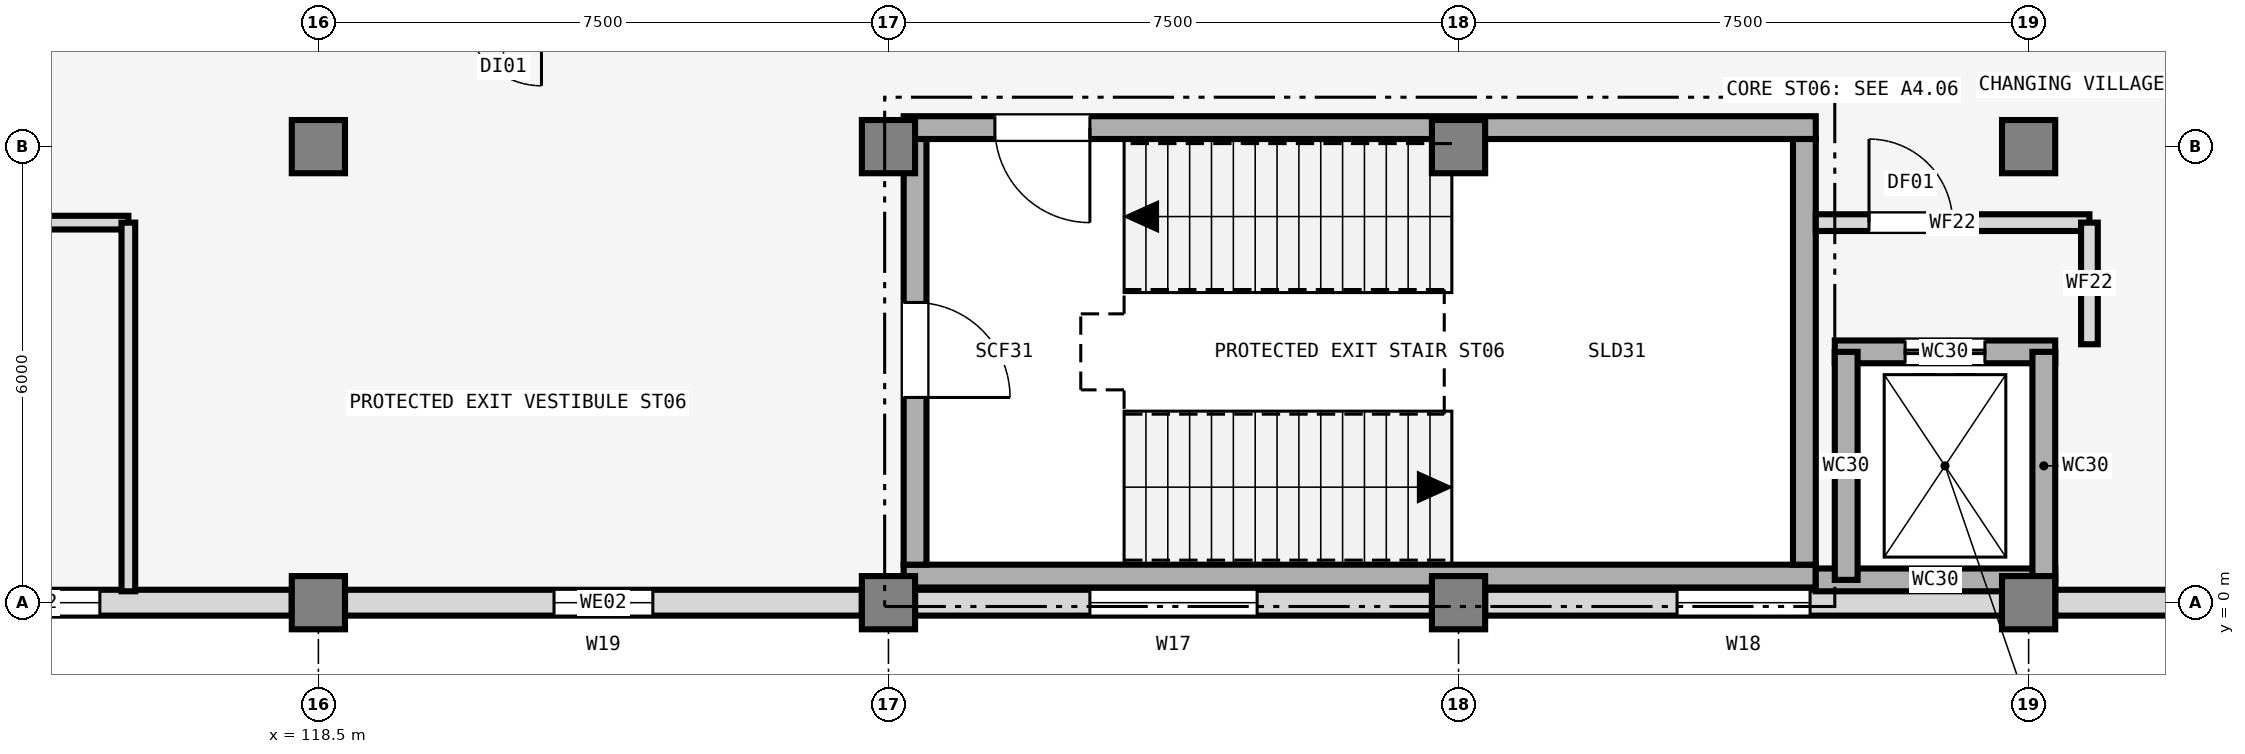
"""IFC4 building model, lengths in metres.
Left out: names, types, materials, properties, quantities, classifications, styles, units other than length and angle.
Written with IfcOpenShell. Run it as: python <this file> out.ifc"""

import sys

from ifc_helpers import new_model, si_unit, direction, frame, frame_2d, origin, origin_2d, place, context, subcontext, project, spatial, rectangle, extrude, element, fill, save


model = new_model("IFC4")
c1 = context("Model", 3, precision=1e-05, world=origin(), true_north=direction((0.0, 1.0)))
c2 = subcontext(c1, "Body", "Model", "MODEL_VIEW")
j1 = project(units=[si_unit("LENGTHUNIT", "METRE"), si_unit("PLANEANGLEUNIT", "RADIAN")], contexts=[c1])
p1 = place(None, origin())
s1 = spatial("IfcSite", under=j1, at=p1, CompositionType="ELEMENT")
p2 = place(p1, origin())
s2 = spatial("IfcBuilding", under=s1, at=p2, CompositionType="ELEMENT")
p3 = place(p2, origin())
s3 = spatial("IfcBuildingStorey", under=s2, at=p3, CompositionType="ELEMENT", Elevation=0.0)
for number, where, z_axis, x_axis in (
    (1, (118.5, 0.0, 0.0), (0.0, 0.0, 1.0), (1.0, 0.0, 0.0)),
    (2, (118.5, 6.0, 0.0), (0.0, 0.0, 1.0), (1.0, 0.0, 0.0)),
    (3, (126.0, 0.0, 0.0), (0.0, 0.0, 1.0), (1.0, 0.0, 0.0)),
    (4, (126.0, 6.0, 0.0), (0.0, 0.0, 1.0), (1.0, 0.0, 0.0)),
    (5, (133.5, 0.0, 0.0), (0.0, 0.0, 1.0), (1.0, 0.0, 0.0)),
    (6, (133.5, 6.0, 0.0), (0.0, 0.0, 1.0), (1.0, 0.0, 0.0)),
    (7, (141.0, 0.0, 0.0), (0.0, 0.0, 1.0), (1.0, 0.0, 0.0)),
    (8, (141.0, 6.0, 0.0), (0.0, 0.0, 1.0), (1.0, 0.0, 0.0)),
):
    element("IfcColumn", number, at=place(p3, frame(where, z_axis=z_axis, x_axis=x_axis)), inside=s3, PredefinedType="COLUMN", context=c2, shape_type="SweptSolid", body=[
        extrude(rectangle(XDim=0.7, YDim=0.7, at=origin_2d()), origin(), (0.0, 0.0, 1.0), 4.8),
    ])
p4 = place(p3, frame((111.35, 0.0, 0.0), z_axis=(0.0, 0.0, 1.0), x_axis=(1.0, 0.0, 0.0)))
e9 = element("IfcWall", 9, at=p4, inside=s3, PredefinedType="SOLIDWALL", context=c2, shape_type="SweptSolid", body=[
    extrude(rectangle(XDim=6.8, YDim=0.34, at=frame_2d((3.4, 0.0))), origin(), (0.0, 0.0, 1.0), 3.93),
])
p5 = place(p4, frame((2.525, 0.0, 2.05)))
e10 = element("IfcOpeningElement", 10, at=p5, cuts=e9, PredefinedType="OPENING", context=c2, shape_type="SweptSolid", body=[
    extrude(rectangle(XDim=1.75, YDim=0.9, at=frame_2d((0.875, 0.45))), frame((0.0, 0.18, 0.0), z_axis=(0.0, -1.0, 0.0), x_axis=(1.0, 0.0, 0.0)), (0.0, 0.0, 1.0), 0.36),
])
p6 = place(p3, frame((118.85, 0.0, 0.0), z_axis=(0.0, 0.0, 1.0), x_axis=(1.0, 0.0, 0.0)))
e11 = element("IfcWall", 11, at=p6, inside=s3, PredefinedType="SOLIDWALL", context=c2, shape_type="SweptSolid", body=[
    extrude(rectangle(XDim=6.8, YDim=0.34, at=frame_2d((3.4, 0.0))), origin(), (0.0, 0.0, 1.0), 3.93),
])
p7 = place(p6, frame((2.75, 0.0, 2.05)))
e12 = element("IfcOpeningElement", 12, at=p7, cuts=e11, PredefinedType="OPENING", context=c2, shape_type="SweptSolid", body=[
    extrude(rectangle(XDim=1.3, YDim=0.85, at=frame_2d((0.65, 0.425))), frame((0.0, 0.18, 0.0), z_axis=(0.0, -1.0, 0.0), x_axis=(1.0, 0.0, 0.0)), (0.0, 0.0, 1.0), 0.36),
])
p8 = place(p3, frame((126.35, 0.0, 0.0), z_axis=(0.0, 0.0, 1.0), x_axis=(1.0, 0.0, 0.0)))
e13 = element("IfcWall", 13, at=p8, inside=s3, PredefinedType="SOLIDWALL", context=c2, shape_type="SweptSolid", body=[
    extrude(rectangle(XDim=6.8, YDim=0.34, at=frame_2d((3.4, 0.0))), origin(), (0.0, 0.0, 1.0), 3.93),
])
p9 = place(p8, frame((2.3, 0.0, 2.05)))
e14 = element("IfcOpeningElement", 14, at=p9, cuts=e13, PredefinedType="OPENING", context=c2, shape_type="SweptSolid", body=[
    extrude(rectangle(XDim=2.2, YDim=0.95, at=frame_2d((1.1, 0.475))), frame((0.0, 0.18, 0.0), z_axis=(0.0, -1.0, 0.0), x_axis=(1.0, 0.0, 0.0)), (0.0, 0.0, 1.0), 0.36),
])
p10 = place(p3, frame((133.85, 0.0, 0.0), z_axis=(0.0, 0.0, 1.0), x_axis=(1.0, 0.0, 0.0)))
e15 = element("IfcWall", 15, at=p10, inside=s3, PredefinedType="SOLIDWALL", context=c2, shape_type="SweptSolid", body=[
    extrude(rectangle(XDim=6.8, YDim=0.34, at=frame_2d((3.4, 0.0))), origin(), (0.0, 0.0, 1.0), 3.93),
])
p11 = place(p10, frame((2.525, 0.0, 2.05)))
e16 = element("IfcOpeningElement", 16, at=p11, cuts=e15, PredefinedType="OPENING", context=c2, shape_type="SweptSolid", body=[
    extrude(rectangle(XDim=1.75, YDim=0.9, at=frame_2d((0.875, 0.45))), frame((0.0, 0.18, 0.0), z_axis=(0.0, -1.0, 0.0), x_axis=(1.0, 0.0, 0.0)), (0.0, 0.0, 1.0), 0.36),
])
p12 = place(p3, frame((141.35, 0.0, 0.0), z_axis=(0.0, 0.0, 1.0), x_axis=(1.0, 0.0, 0.0)))
e17 = element("IfcWall", 17, at=p12, inside=s3, PredefinedType="SOLIDWALL", context=c2, shape_type="SweptSolid", body=[
    extrude(rectangle(XDim=8.3, YDim=0.34, at=frame_2d((4.15, 0.0))), origin(), (0.0, 0.0, 1.0), 3.93),
])
p13 = place(p12, frame((2.85, 0.0, 0.0)))
e18 = element("IfcOpeningElement", 18, at=p13, cuts=e17, PredefinedType="OPENING", context=c2, shape_type="SweptSolid", body=[
    extrude(rectangle(XDim=2.6, YDim=2.5, at=frame_2d((1.3, 1.25))), frame((0.0, 0.18, 0.0), z_axis=(0.0, -1.0, 0.0), x_axis=(1.0, 0.0, 0.0)), (0.0, 0.0, 1.0), 0.36),
])
p14 = place(p3, frame((138.2, 0.35, 0.0), z_axis=(0.0, 0.0, 1.0), x_axis=(-1.0, 0.0, 0.0)))
e19 = element("IfcWall", 19, at=p14, inside=s3, PredefinedType="SHEAR", context=c2, shape_type="SweptSolid", body=[
    extrude(rectangle(XDim=12.0, YDim=0.3, at=frame_2d((6.0, 0.0))), origin(), (0.0, 0.0, 1.0), 4.8),
])
p15 = place(p3, frame((138.2, 6.25, 0.0), z_axis=(0.0, 0.0, 1.0), x_axis=(-1.0, 0.0, 0.0)))
e20 = element("IfcWall", 20, at=p15, inside=s3, PredefinedType="SHEAR", context=c2, shape_type="SweptSolid", body=[
    extrude(rectangle(XDim=12.0, YDim=0.3, at=frame_2d((6.0, 0.0))), origin(), (0.0, 0.0, 1.0), 4.8),
])
p16 = place(p15, frame((9.55, 0.0, 0.0)))
e21 = element("IfcOpeningElement", 21, at=p16, cuts=e20, PredefinedType="OPENING", context=c2, shape_type="SweptSolid", body=[
    extrude(rectangle(XDim=1.25, YDim=2.15, at=frame_2d((0.625, 1.075))), frame((0.0, 0.16, 0.0), z_axis=(0.0, -1.0, 0.0), x_axis=(1.0, 0.0, 0.0)), (0.0, 0.0, 1.0), 0.32),
])
p17 = place(p3, frame((126.35, 6.1, 0.0), z_axis=(0.0, 0.0, 1.0), x_axis=(0.0, -1.0, 0.0)))
e22 = element("IfcWall", 22, at=p17, inside=s3, PredefinedType="SHEAR", context=c2, shape_type="SweptSolid", body=[
    extrude(rectangle(XDim=5.6, YDim=0.3, at=frame_2d((2.8, 0.0))), origin(), (0.0, 0.0, 1.0), 4.8),
])
p18 = place(p17, frame((2.15, 0.0, 0.0)))
e23 = element("IfcOpeningElement", 23, at=p18, cuts=e22, PredefinedType="OPENING", context=c2, shape_type="SweptSolid", body=[
    extrude(rectangle(XDim=1.25, YDim=2.15, at=frame_2d((0.625, 1.075))), frame((0.0, 0.16, 0.0), z_axis=(0.0, -1.0, 0.0), x_axis=(1.0, 0.0, 0.0)), (0.0, 0.0, 1.0), 0.32),
])
p19 = place(p3, frame((138.05, 0.5, 0.0), z_axis=(0.0, 0.0, 1.0), x_axis=(0.0, 1.0, 0.0)))
e24 = element("IfcWall", 24, at=p19, inside=s3, PredefinedType="SHEAR", context=c2, shape_type="SweptSolid", body=[
    extrude(rectangle(XDim=5.6, YDim=0.3, at=frame_2d((2.8, 0.0))), origin(), (0.0, 0.0, 1.0), 4.8),
])
p20 = place(p3, frame((138.2, 0.3, 0.0), z_axis=(0.0, 0.0, 1.0), x_axis=(1.0, 0.0, 0.0)))
e25 = element("IfcWall", 25, at=p20, inside=s3, PredefinedType="SHEAR", context=c2, shape_type="SweptSolid", body=[
    extrude(rectangle(XDim=3.15, YDim=0.3, at=frame_2d((1.575, 0.0))), origin(), (0.0, 0.0, 1.0), 4.8),
])
p21 = place(p3, frame((141.35, 3.3, 0.0), z_axis=(0.0, 0.0, 1.0), x_axis=(-1.0, 0.0, 0.0)))
e26 = element("IfcWall", 26, at=p21, inside=s3, PredefinedType="SHEAR", context=c2, shape_type="SweptSolid", body=[
    extrude(rectangle(XDim=2.9, YDim=0.3, at=frame_2d((1.45, 0.0))), origin(), (0.0, 0.0, 1.0), 4.8),
])
p22 = place(p21, frame((0.925, 0.0, 0.0)))
e27 = element("IfcOpeningElement", 27, at=p22, cuts=e26, PredefinedType="OPENING", context=c2, shape_type="SweptSolid", body=[
    extrude(rectangle(XDim=1.05, YDim=2.15, at=frame_2d((0.525, 1.075))), frame((0.0, 0.16, 0.0), z_axis=(0.0, -1.0, 0.0), x_axis=(1.0, 0.0, 0.0)), (0.0, 0.0, 1.0), 0.32),
])
for number, where, z_axis, x_axis in (
    (28, (138.6, 3.3, 0.0), (0.0, 0.0, 1.0), (0.0, -1.0, 0.0)),
    (29, (141.2, 0.3, 0.0), (0.0, 0.0, 1.0), (0.0, 1.0, 0.0)),
):
    element("IfcWall", number, at=place(p3, frame(where, z_axis=z_axis, x_axis=x_axis)), inside=s3, PredefinedType="SHEAR", context=c2, shape_type="SweptSolid", body=[
        extrude(rectangle(XDim=3.0, YDim=0.3, at=frame_2d((1.5, 0.0))), origin(), (0.0, 0.0, 1.0), 4.8),
    ])
p23 = place(p3, frame((138.2, 5.0, 0.0), z_axis=(0.0, 0.0, 1.0), x_axis=(1.0, 0.0, 0.0)))
e30 = element("IfcWall", 30, at=p23, inside=s3, PredefinedType="SOLIDWALL", context=c2, shape_type="SweptSolid", body=[
    extrude(rectangle(XDim=3.6, YDim=0.22, at=frame_2d((1.8, 0.0))), origin(), (0.0, 0.0, 1.0), 3.68),
])
p24 = place(p23, frame((0.7, 0.0, 0.0)))
e31 = element("IfcOpeningElement", 31, at=p24, cuts=e30, PredefinedType="OPENING", context=c2, shape_type="SweptSolid", body=[
    extrude(rectangle(XDim=1.1, YDim=2.15, at=frame_2d((0.55, 1.075))), frame((0.0, 0.12, 0.0), z_axis=(0.0, -1.0, 0.0), x_axis=(1.0, 0.0, 0.0)), (0.0, 0.0, 1.0), 0.24),
])
p25 = place(p3, frame((141.8, 3.4, 0.0), z_axis=(0.0, 0.0, 1.0), x_axis=(0.0, 1.0, 0.0)))
e32 = element("IfcWall", 32, at=p25, inside=s3, PredefinedType="SOLIDWALL", context=c2, shape_type="SweptSolid", body=[
    extrude(rectangle(XDim=1.6, YDim=0.22, at=frame_2d((0.8, 0.0))), origin(), (0.0, 0.0, 1.0), 3.68),
])
p26 = place(p3, frame((82.07, 5.0, 0.0), z_axis=(0.0, 0.0, 1.0), x_axis=(1.0, 0.0, 0.0)))
e33 = element("IfcWall", 33, at=p26, inside=s3, PredefinedType="PARTITIONING", context=c2, shape_type="SweptSolid", body=[
    extrude(rectangle(XDim=33.93, YDim=0.18, at=frame_2d((16.965, 0.0))), origin(), (0.0, 0.0, 1.0), 3.68),
])
p27 = place(p26, frame((16.415, 0.0, 0.0)))
e34 = element("IfcOpeningElement", 34, at=p27, cuts=e33, PredefinedType="OPENING", context=c2, shape_type="SweptSolid", body=[
    extrude(rectangle(XDim=1.1, YDim=2.1, at=frame_2d((0.55, 1.05))), frame((0.0, 0.1, 0.0), z_axis=(0.0, -1.0, 0.0), x_axis=(1.0, 0.0, 0.0)), (0.0, 0.0, 1.0), 0.2),
])
p28 = place(p3, frame((116.0, 5.0, 0.0), z_axis=(0.0, 0.0, 1.0), x_axis=(0.0, -1.0, 0.0)))
e35 = element("IfcWall", 35, at=p28, inside=s3, PredefinedType="PARTITIONING", context=c2, shape_type="SweptSolid", body=[
    extrude(rectangle(XDim=4.85, YDim=0.18, at=frame_2d((2.425, 0.0))), origin(), (0.0, 0.0, 1.0), 3.68),
])
p29 = place(p5, origin())
e36 = element("IfcWindow", 36, at=p29, inside=s3, PartitioningType="SINGLE_PANEL", PredefinedType="WINDOW", context=c2, shape_type="SweptSolid", body=[
    extrude(rectangle(XDim=1.75, YDim=0.9, at=frame_2d((0.875, 0.45))), frame((0.0, 0.03, 0.0), z_axis=(0.0, -1.0, 0.0), x_axis=(1.0, 0.0, 0.0)), (0.0, 0.0, 1.0), 0.06),
])
fill(e10, e36)
p30 = place(p7, origin())
e37 = element("IfcWindow", 37, at=p30, inside=s3, PartitioningType="SINGLE_PANEL", PredefinedType="WINDOW", context=c2, shape_type="SweptSolid", body=[
    extrude(rectangle(XDim=1.3, YDim=0.85, at=frame_2d((0.65, 0.425))), frame((0.0, 0.03, 0.0), z_axis=(0.0, -1.0, 0.0), x_axis=(1.0, 0.0, 0.0)), (0.0, 0.0, 1.0), 0.06),
])
fill(e12, e37)
p31 = place(p9, origin())
e38 = element("IfcWindow", 38, at=p31, inside=s3, PartitioningType="SINGLE_PANEL", PredefinedType="WINDOW", context=c2, shape_type="SweptSolid", body=[
    extrude(rectangle(XDim=2.2, YDim=0.95, at=frame_2d((1.1, 0.475))), frame((0.0, 0.03, 0.0), z_axis=(0.0, -1.0, 0.0), x_axis=(1.0, 0.0, 0.0)), (0.0, 0.0, 1.0), 0.06),
])
fill(e14, e38)
p32 = place(p11, origin())
e39 = element("IfcWindow", 39, at=p32, inside=s3, PartitioningType="SINGLE_PANEL", PredefinedType="WINDOW", context=c2, shape_type="SweptSolid", body=[
    extrude(rectangle(XDim=1.75, YDim=0.9, at=frame_2d((0.875, 0.45))), frame((0.0, 0.03, 0.0), z_axis=(0.0, -1.0, 0.0), x_axis=(1.0, 0.0, 0.0)), (0.0, 0.0, 1.0), 0.06),
])
fill(e16, e39)
p33 = place(p16, origin())
e40 = element("IfcDoor", 40, at=p33, inside=s3, OperationType="SINGLE_SWING_LEFT", PredefinedType="DOOR", context=c2, shape_type="SweptSolid", body=[
    extrude(rectangle(XDim=1.25, YDim=2.15, at=frame_2d((0.625, 1.075))), frame((0.0, 0.025, 0.0), z_axis=(0.0, -1.0, 0.0), x_axis=(1.0, 0.0, 0.0)), (0.0, 0.0, 1.0), 0.05),
])
fill(e21, e40)
p34 = place(p18, origin())
e41 = element("IfcDoor", 41, at=p34, inside=s3, OperationType="SINGLE_SWING_RIGHT", PredefinedType="DOOR", context=c2, shape_type="SweptSolid", body=[
    extrude(rectangle(XDim=1.25, YDim=2.15, at=frame_2d((0.625, 1.075))), frame((0.0, 0.025, 0.0), z_axis=(0.0, -1.0, 0.0), x_axis=(1.0, 0.0, 0.0)), (0.0, 0.0, 1.0), 0.05),
])
fill(e23, e41)
p35 = place(p22, origin())
e42 = element("IfcDoor", 42, at=p35, inside=s3, OperationType="DOUBLE_DOOR_SLIDING", PredefinedType="DOOR", context=c2, shape_type="SweptSolid", body=[
    extrude(rectangle(XDim=1.05, YDim=2.15, at=frame_2d((0.525, 1.075))), frame((0.0, 0.025, 0.0), z_axis=(0.0, -1.0, 0.0), x_axis=(1.0, 0.0, 0.0)), (0.0, 0.0, 1.0), 0.05),
])
fill(e27, e42)
p36 = place(p24, origin())
e43 = element("IfcDoor", 43, at=p36, inside=s3, OperationType="SINGLE_SWING_LEFT", PredefinedType="DOOR", context=c2, shape_type="SweptSolid", body=[
    extrude(rectangle(XDim=1.1, YDim=2.15, at=frame_2d((0.55, 1.075))), frame((0.0, 0.025, 0.0), z_axis=(0.0, -1.0, 0.0), x_axis=(1.0, 0.0, 0.0)), (0.0, 0.0, 1.0), 0.05),
])
fill(e31, e43)
save(model, sys.argv[1])
